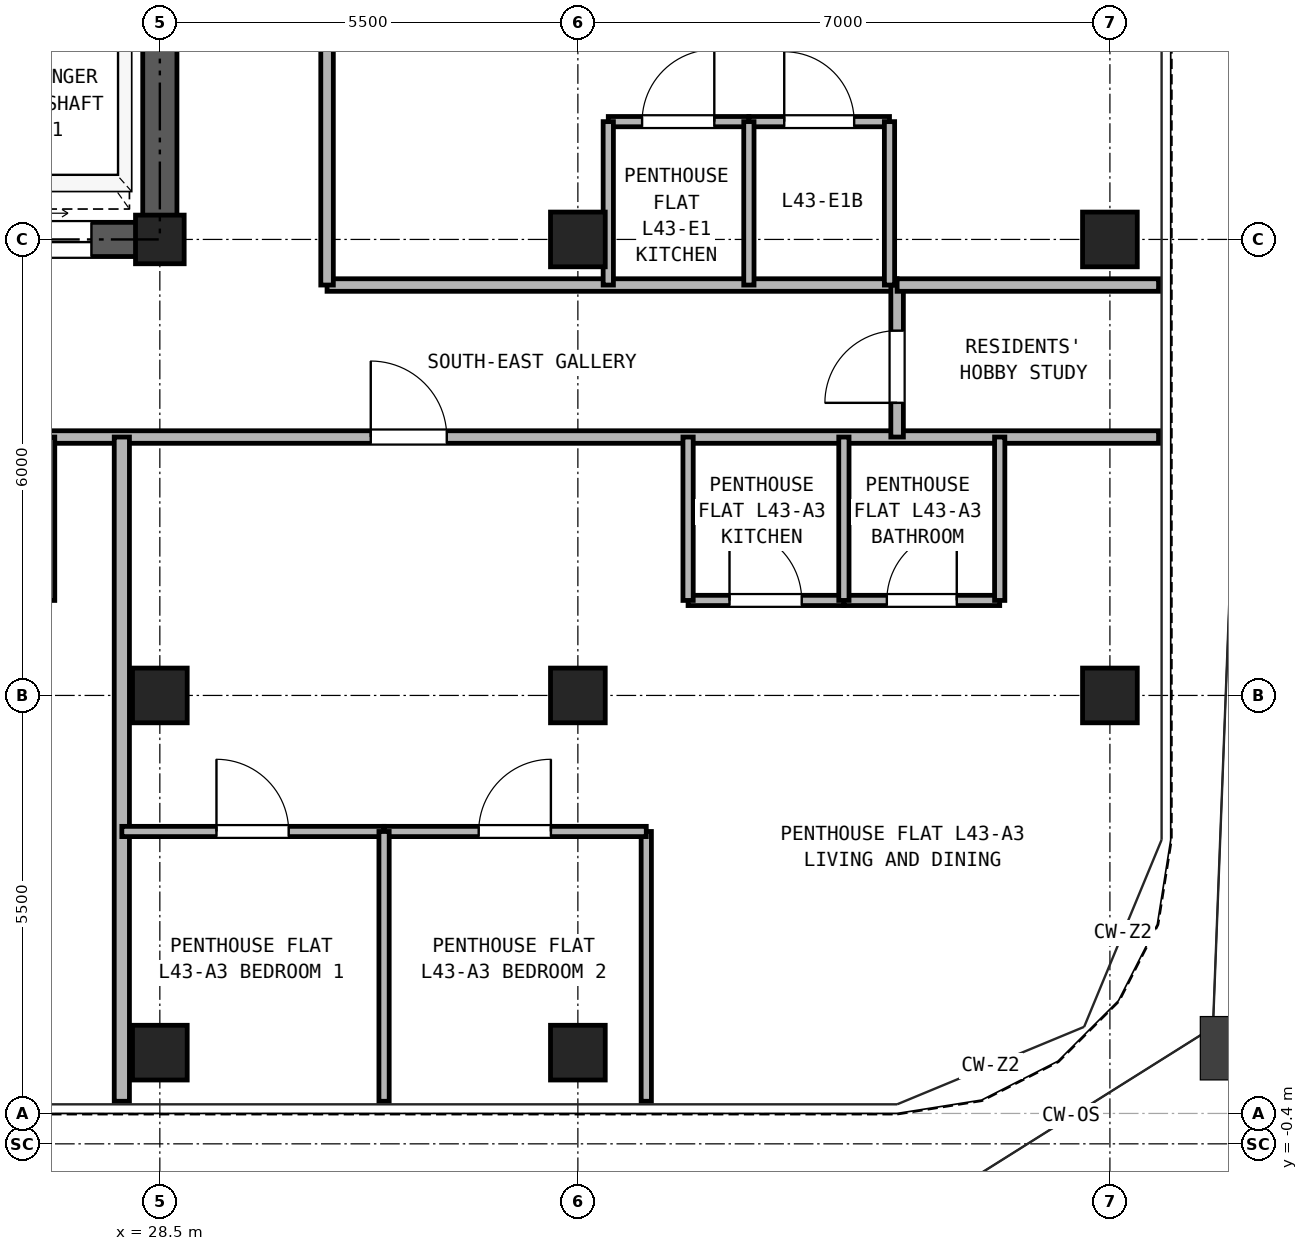
"""IFC4 building model, lengths in metres.
Left out: names, types, materials, properties, quantities, classifications, styles, units other than length and angle.
Written with IfcOpenShell. Run it as: python <this file> out.ifc"""

import sys

from ifc_helpers import new_model, si_unit, direction, frame, frame_2d, origin, origin_2d, place, context, subcontext, project, spatial, rectangle, hollow_rectangle, extrude, source, transform, mapped, element, fill, save


model = new_model("IFC4")
c1 = context("Model", 3, precision=1e-05, world=origin(), true_north=direction((0.0, 1.0)))
c2 = subcontext(c1, "Body", "Model", "MODEL_VIEW")
j1 = project(units=[si_unit("LENGTHUNIT", "METRE"), si_unit("PLANEANGLEUNIT", "RADIAN")], contexts=[c1])
p1 = place(None, origin())
s1 = spatial("IfcSite", under=j1, at=p1, CompositionType="ELEMENT")
p2 = place(p1, origin())
s2 = spatial("IfcBuilding", under=s1, at=p2, CompositionType="ELEMENT")
p3 = place(p2, frame((0.0, 0.0, 156.1)))
s3 = spatial("IfcBuildingStorey", under=s2, at=p3, CompositionType="ELEMENT", Elevation=156.1)
m1 = source(origin(), c2, "Body", "SweptSolid", [
    extrude(hollow_rectangle(XDim=0.72, YDim=0.72, WallThickness=0.04, at=origin_2d()), origin(), (0.0, 0.0, 1.0), 2.95),
])
for number, where, z_axis, x_axis in (
    (1, (28.5, 0.8, 0.0), (0.0, 0.0, 1.0), (1.0, 0.0, 0.0)),
    (2, (34.0, 0.8, 0.0), (0.0, 0.0, 1.0), (1.0, 0.0, 0.0)),
    (3, (41.0, 5.5, 0.0), (0.0, 0.0, 1.0), (1.0, 0.0, 0.0)),
    (4, (41.0, 11.5, 0.0), (0.0, 0.0, 1.0), (1.0, 0.0, 0.0)),
    (5, (28.5, 5.5, 0.0), (0.0, 0.0, 1.0), (1.0, 0.0, 0.0)),
):
    element("IfcColumn", number, at=place(p3, frame(where, z_axis=z_axis, x_axis=x_axis)), inside=s3, PredefinedType="COLUMN", context=c2, shape_type="MappedRepresentation", body=[
        mapped(m1, transform((0.0, 0.0, 0.0), x_axis=(1.0, 0.0, 0.0), y_axis=(0.0, 1.0, 0.0), z_axis=(0.0, 0.0, 1.0), scale=1.0)),
    ])
m2 = source(origin(), c2, "Body", "SweptSolid", [
    extrude(hollow_rectangle(XDim=0.64, YDim=0.64, WallThickness=0.035, at=origin_2d()), origin(), (0.0, 0.0, 1.0), 2.95),
])
p4 = place(p3, frame((28.5, 11.5, 0.0), z_axis=(0.0, 0.0, 1.0), x_axis=(1.0, 0.0, 0.0)))
e6 = element("IfcColumn", 6, at=p4, inside=s3, PredefinedType="COLUMN", context=c2, shape_type="MappedRepresentation", body=[
    mapped(m2, transform((0.0, 0.0, 0.0), x_axis=(1.0, 0.0, 0.0), y_axis=(0.0, 1.0, 0.0), z_axis=(0.0, 0.0, 1.0), scale=1.0)),
])
for number, where, z_axis, x_axis in (
    (7, (34.0, 5.5, 0.0), (0.0, 0.0, 1.0), (1.0, 0.0, 0.0)),
    (8, (34.0, 11.5, 0.0), (0.0, 0.0, 1.0), (1.0, 0.0, 0.0)),
):
    element("IfcColumn", number, at=place(p3, frame(where, z_axis=z_axis, x_axis=x_axis)), inside=s3, PredefinedType="COLUMN", context=c2, shape_type="MappedRepresentation", body=[
        mapped(m1, transform((0.0, 0.0, 0.0), x_axis=(1.0, 0.0, 0.0), y_axis=(0.0, 1.0, 0.0), z_axis=(0.0, 0.0, 1.0), scale=1.0)),
    ])
p5 = place(p3, frame((18.275, 11.5, 0.0), z_axis=(0.0, 0.0, 1.0), x_axis=(1.0, 0.0, 0.0)))
e9 = element("IfcWall", 9, at=p5, inside=s3, PredefinedType="SHEAR", context=c2, shape_type="SweptSolid", body=[
    extrude(rectangle(XDim=10.45, YDim=0.45, at=frame_2d((5.225, 0.0))), origin(), (0.0, 0.0, 1.0), 2.95),
])
p6 = place(p5, frame((2.325, 0.0, 0.0)))
e10 = element("IfcOpeningElement", 10, at=p6, cuts=e9, PredefinedType="OPENING", context=c2, shape_type="SweptSolid", body=[
    extrude(rectangle(XDim=0.95, YDim=2.15, at=frame_2d((0.475, 1.075))), frame((0.0, 0.235, 0.0), z_axis=(0.0, -1.0, 0.0), x_axis=(1.0, 0.0, 0.0)), (0.0, 0.0, 1.0), 0.47),
])
p7 = place(p5, frame((8.225, 0.0, 0.0)))
e11 = element("IfcOpeningElement", 11, at=p7, cuts=e9, PredefinedType="OPENING", context=c2, shape_type="SweptSolid", body=[
    extrude(rectangle(XDim=1.1, YDim=2.25, at=frame_2d((0.55, 1.125))), frame((0.0, 0.235, 0.0), z_axis=(0.0, -1.0, 0.0), x_axis=(1.0, 0.0, 0.0)), (0.0, 0.0, 1.0), 0.47),
])
p8 = place(p3, frame((28.5, 11.725, 0.0), z_axis=(0.0, 0.0, 1.0), x_axis=(0.0, 1.0, 0.0)))
e12 = element("IfcWall", 12, at=p8, inside=s3, PredefinedType="SHEAR", context=c2, shape_type="SweptSolid", body=[
    extrude(rectangle(XDim=16.8, YDim=0.45, at=frame_2d((8.4, 0.0))), origin(), (0.0, 0.0, 1.0), 2.95),
])
p9 = place(p8, frame((7.425, 0.0, 0.0)))
e13 = element("IfcOpeningElement", 13, at=p9, cuts=e12, PredefinedType="OPENING", context=c2, shape_type="SweptSolid", body=[
    extrude(rectangle(XDim=1.15, YDim=2.2, at=frame_2d((0.575, 1.1))), frame((0.0, 0.235, 0.0), z_axis=(0.0, -1.0, 0.0), x_axis=(1.0, 0.0, 0.0)), (0.0, 0.0, 1.0), 0.47),
])
p10 = place(p3, frame((0.16, 8.9, 0.0), z_axis=(0.0, 0.0, 1.0), x_axis=(1.0, 0.0, 0.0)))
e14 = element("IfcWall", 14, at=p10, inside=s3, PredefinedType="PARTITIONING", context=c2, shape_type="SweptSolid", body=[
    extrude(rectangle(XDim=41.48, YDim=0.165, at=frame_2d((20.74, 0.0))), origin(), (0.0, 0.0, 1.0), 2.95),
])
p11 = place(p10, frame((12.165, 0.0, 0.0)))
e15 = element("IfcOpeningElement", 15, at=p11, cuts=e14, PredefinedType="OPENING", context=c2, shape_type="SweptSolid", body=[
    extrude(rectangle(XDim=1.0, YDim=2.15, at=frame_2d((0.5, 1.075))), frame((0.0, 0.093, 0.0), z_axis=(0.0, -1.0, 0.0), x_axis=(1.0, 0.0, 0.0)), (0.0, 0.0, 1.0), 0.185),
])
p12 = place(p10, frame((17.965, 0.0, 0.0)))
e16 = element("IfcOpeningElement", 16, at=p12, cuts=e14, PredefinedType="OPENING", context=c2, shape_type="SweptSolid", body=[
    extrude(rectangle(XDim=1.0, YDim=2.15, at=frame_2d((0.5, 1.075))), frame((0.0, 0.093, 0.0), z_axis=(0.0, -1.0, 0.0), x_axis=(1.0, 0.0, 0.0)), (0.0, 0.0, 1.0), 0.185),
])
p13 = place(p10, frame((31.115, 0.0, 0.0)))
e17 = element("IfcOpeningElement", 17, at=p13, cuts=e14, PredefinedType="OPENING", context=c2, shape_type="SweptSolid", body=[
    extrude(rectangle(XDim=1.0, YDim=2.15, at=frame_2d((0.5, 1.075))), frame((0.0, 0.093, 0.0), z_axis=(0.0, -1.0, 0.0), x_axis=(1.0, 0.0, 0.0)), (0.0, 0.0, 1.0), 0.185),
])
p14 = place(p3, frame((30.7, 10.9, 0.0), z_axis=(0.0, 0.0, 1.0), x_axis=(1.0, 0.0, 0.0)))
e18 = element("IfcWall", 18, at=p14, inside=s3, PredefinedType="PARTITIONING", context=c2, shape_type="SweptSolid", body=[
    extrude(rectangle(XDim=7.5, YDim=0.165, at=frame_2d((3.75, 0.0))), origin(), (0.0, 0.0, 1.0), 2.95),
])
p15 = place(p3, frame((38.2, 8.9, 0.0), z_axis=(0.0, 0.0, 1.0), x_axis=(0.0, 1.0, 0.0)))
e19 = element("IfcWall", 19, at=p15, inside=s3, PredefinedType="PARTITIONING", context=c2, shape_type="SweptSolid", body=[
    extrude(rectangle(XDim=2.0, YDim=0.165, at=frame_2d((1.0, 0.0))), origin(), (0.0, 0.0, 1.0), 2.95),
])
p16 = place(p15, frame((0.45, 0.0, 0.0)))
e20 = element("IfcOpeningElement", 20, at=p16, cuts=e19, PredefinedType="OPENING", context=c2, shape_type="SweptSolid", body=[
    extrude(rectangle(XDim=0.95, YDim=2.15, at=frame_2d((0.475, 1.075))), frame((0.0, 0.093, 0.0), z_axis=(0.0, -1.0, 0.0), x_axis=(1.0, 0.0, 0.0)), (0.0, 0.0, 1.0), 0.185),
])
p17 = place(p3, frame((30.7, 10.9, 0.0), z_axis=(0.0, 0.0, 1.0), x_axis=(0.0, 1.0, 0.0)))
e21 = element("IfcWall", 21, at=p17, inside=s3, PredefinedType="PARTITIONING", context=c2, shape_type="SweptSolid", body=[
    extrude(rectangle(XDim=24.24, YDim=0.165, at=frame_2d((12.12, 0.0))), origin(), (0.0, 0.0, 1.0), 2.95),
])
p18 = place(p17, frame((5.3, 0.0, 0.0)))
e22 = element("IfcOpeningElement", 22, at=p18, cuts=e21, PredefinedType="OPENING", context=c2, shape_type="SweptSolid", body=[
    extrude(rectangle(XDim=1.0, YDim=2.15, at=frame_2d((0.5, 1.075))), frame((0.0, 0.093, 0.0), z_axis=(0.0, -1.0, 0.0), x_axis=(1.0, 0.0, 0.0)), (0.0, 0.0, 1.0), 0.185),
])
p19 = place(p17, frame((15.05, 0.0, 0.0)))
e23 = element("IfcOpeningElement", 23, at=p19, cuts=e21, PredefinedType="OPENING", context=c2, shape_type="SweptSolid", body=[
    extrude(rectangle(XDim=1.0, YDim=2.15, at=frame_2d((0.5, 1.075))), frame((0.0, 0.093, 0.0), z_axis=(0.0, -1.0, 0.0), x_axis=(1.0, 0.0, 0.0)), (0.0, 0.0, 1.0), 0.185),
])
p20 = place(p3, frame((27.05, 6.75, 0.0), z_axis=(0.0, 0.0, 1.0), x_axis=(0.0, 1.0, 0.0)))
e24 = element("IfcWall", 24, at=p20, inside=s3, PredefinedType="PARTITIONING", context=c2, shape_type="SweptSolid", body=[
    extrude(rectangle(XDim=2.15, YDim=0.135, at=frame_2d((1.075, 0.0))), origin(), (0.0, 0.0, 1.0), 2.95),
])
p21 = place(p3, frame((28.0, 0.16, 0.0), z_axis=(0.0, 0.0, 1.0), x_axis=(0.0, 1.0, 0.0)))
e25 = element("IfcWall", 25, at=p21, inside=s3, PredefinedType="PARTITIONING", context=c2, shape_type="SweptSolid", body=[
    extrude(rectangle(XDim=8.74, YDim=0.2, at=frame_2d((4.37, 0.0))), origin(), (0.0, 0.0, 1.0), 2.95),
])
p22 = place(p3, frame((35.45, 6.75, 0.0), z_axis=(0.0, 0.0, 1.0), x_axis=(1.0, 0.0, 0.0)))
e26 = element("IfcWall", 26, at=p22, inside=s3, PredefinedType="PARTITIONING", context=c2, shape_type="SweptSolid", body=[
    extrude(rectangle(XDim=2.05, YDim=0.135, at=frame_2d((1.025, 0.0))), origin(), (0.0, 0.0, 1.0), 2.95),
])
p23 = place(p22, frame((0.545, 0.0, 0.0)))
e27 = element("IfcOpeningElement", 27, at=p23, cuts=e26, PredefinedType="OPENING", context=c2, shape_type="SweptSolid", body=[
    extrude(rectangle(XDim=0.95, YDim=2.15, at=frame_2d((0.475, 1.075))), frame((0.0, 0.077, 0.0), z_axis=(0.0, -1.0, 0.0), x_axis=(1.0, 0.0, 0.0)), (0.0, 0.0, 1.0), 0.155),
])
p24 = place(p3, frame((37.5, 6.75, 0.0), z_axis=(0.0, 0.0, 1.0), x_axis=(1.0, 0.0, 0.0)))
e28 = element("IfcWall", 28, at=p24, inside=s3, PredefinedType="PARTITIONING", context=c2, shape_type="SweptSolid", body=[
    extrude(rectangle(XDim=2.05, YDim=0.135, at=frame_2d((1.025, 0.0))), origin(), (0.0, 0.0, 1.0), 2.95),
])
p25 = place(p24, frame((0.565, 0.0, 0.0)))
e29 = element("IfcOpeningElement", 29, at=p25, cuts=e28, PredefinedType="OPENING", context=c2, shape_type="SweptSolid", body=[
    extrude(rectangle(XDim=0.92, YDim=2.1, at=frame_2d((0.46, 1.05))), frame((0.0, 0.077, 0.0), z_axis=(0.0, -1.0, 0.0), x_axis=(1.0, 0.0, 0.0)), (0.0, 0.0, 1.0), 0.155),
])
for number, where, z_axis, x_axis in (
    (30, (35.45, 6.75, 0.0), (0.0, 0.0, 1.0), (0.0, 1.0, 0.0)),
    (31, (37.5, 6.75, 0.0), (0.0, 0.0, 1.0), (0.0, 1.0, 0.0)),
    (32, (39.55, 6.75, 0.0), (0.0, 0.0, 1.0), (0.0, 1.0, 0.0)),
):
    element("IfcWall", number, at=place(p3, frame(where, z_axis=z_axis, x_axis=x_axis)), inside=s3, PredefinedType="PARTITIONING", context=c2, shape_type="SweptSolid", body=[
        extrude(rectangle(XDim=2.15, YDim=0.135, at=frame_2d((1.075, 0.0))), origin(), (0.0, 0.0, 1.0), 2.95),
    ])
p26 = place(p3, frame((34.9, 0.16, 0.0), z_axis=(0.0, 0.0, 1.0), x_axis=(0.0, 1.0, 0.0)))
e33 = element("IfcWall", 33, at=p26, inside=s3, PredefinedType="PARTITIONING", context=c2, shape_type="SweptSolid", body=[
    extrude(rectangle(XDim=3.55, YDim=0.135, at=frame_2d((1.775, 0.0))), origin(), (0.0, 0.0, 1.0), 2.95),
])
p27 = place(p3, frame((28.0, 3.71, 0.0), z_axis=(0.0, 0.0, 1.0), x_axis=(1.0, 0.0, 0.0)))
e34 = element("IfcWall", 34, at=p27, inside=s3, PredefinedType="PARTITIONING", context=c2, shape_type="SweptSolid", body=[
    extrude(rectangle(XDim=3.45, YDim=0.135, at=frame_2d((1.725, 0.0))), origin(), (0.0, 0.0, 1.0), 2.95),
])
p28 = place(p27, frame((1.245, 0.0, 0.0)))
e35 = element("IfcOpeningElement", 35, at=p28, cuts=e34, PredefinedType="OPENING", context=c2, shape_type="SweptSolid", body=[
    extrude(rectangle(XDim=0.95, YDim=2.15, at=frame_2d((0.475, 1.075))), frame((0.0, 0.077, 0.0), z_axis=(0.0, -1.0, 0.0), x_axis=(1.0, 0.0, 0.0)), (0.0, 0.0, 1.0), 0.155),
])
p29 = place(p3, frame((31.45, 3.71, 0.0), z_axis=(0.0, 0.0, 1.0), x_axis=(1.0, 0.0, 0.0)))
e36 = element("IfcWall", 36, at=p29, inside=s3, PredefinedType="PARTITIONING", context=c2, shape_type="SweptSolid", body=[
    extrude(rectangle(XDim=3.45, YDim=0.135, at=frame_2d((1.725, 0.0))), origin(), (0.0, 0.0, 1.0), 2.95),
])
p30 = place(p29, frame((1.245, 0.0, 0.0)))
e37 = element("IfcOpeningElement", 37, at=p30, cuts=e36, PredefinedType="OPENING", context=c2, shape_type="SweptSolid", body=[
    extrude(rectangle(XDim=0.95, YDim=2.15, at=frame_2d((0.475, 1.075))), frame((0.0, 0.077, 0.0), z_axis=(0.0, -1.0, 0.0), x_axis=(1.0, 0.0, 0.0)), (0.0, 0.0, 1.0), 0.155),
])
p31 = place(p3, frame((31.45, 0.16, 0.0), z_axis=(0.0, 0.0, 1.0), x_axis=(0.0, 1.0, 0.0)))
e38 = element("IfcWall", 38, at=p31, inside=s3, PredefinedType="PARTITIONING", context=c2, shape_type="SweptSolid", body=[
    extrude(rectangle(XDim=3.55, YDim=0.135, at=frame_2d((1.775, 0.0))), origin(), (0.0, 0.0, 1.0), 2.95),
])
p32 = place(p3, frame((38.2, 10.9, 0.0), z_axis=(0.0, 0.0, 1.0), x_axis=(1.0, 0.0, 0.0)))
e39 = element("IfcWall", 39, at=p32, inside=s3, PredefinedType="PARTITIONING", context=c2, shape_type="SweptSolid", body=[
    extrude(rectangle(XDim=3.44, YDim=0.165, at=frame_2d((1.72, 0.0))), origin(), (0.0, 0.0, 1.0), 2.95),
])
p33 = place(p3, frame((34.4, 13.05, 0.0), z_axis=(0.0, 0.0, 1.0), x_axis=(1.0, 0.0, 0.0)))
e40 = element("IfcWall", 40, at=p33, inside=s3, PredefinedType="PARTITIONING", context=c2, shape_type="SweptSolid", body=[
    extrude(rectangle(XDim=1.85, YDim=0.135, at=frame_2d((0.925, 0.0))), origin(), (0.0, 0.0, 1.0), 2.95),
])
p34 = place(p33, frame((0.445, 0.0, 0.0)))
e41 = element("IfcOpeningElement", 41, at=p34, cuts=e40, PredefinedType="OPENING", context=c2, shape_type="SweptSolid", body=[
    extrude(rectangle(XDim=0.95, YDim=2.15, at=frame_2d((0.475, 1.075))), frame((0.0, 0.077, 0.0), z_axis=(0.0, -1.0, 0.0), x_axis=(1.0, 0.0, 0.0)), (0.0, 0.0, 1.0), 0.155),
])
p35 = place(p3, frame((36.25, 13.05, 0.0), z_axis=(0.0, 0.0, 1.0), x_axis=(1.0, 0.0, 0.0)))
e42 = element("IfcWall", 42, at=p35, inside=s3, PredefinedType="PARTITIONING", context=c2, shape_type="SweptSolid", body=[
    extrude(rectangle(XDim=1.85, YDim=0.135, at=frame_2d((0.925, 0.0))), origin(), (0.0, 0.0, 1.0), 2.95),
])
p36 = place(p35, frame((0.465, 0.0, 0.0)))
e43 = element("IfcOpeningElement", 43, at=p36, cuts=e42, PredefinedType="OPENING", context=c2, shape_type="SweptSolid", body=[
    extrude(rectangle(XDim=0.92, YDim=2.1, at=frame_2d((0.46, 1.05))), frame((0.0, 0.077, 0.0), z_axis=(0.0, -1.0, 0.0), x_axis=(1.0, 0.0, 0.0)), (0.0, 0.0, 1.0), 0.155),
])
for number, where, z_axis, x_axis in (
    (44, (34.4, 10.9, 0.0), (0.0, 0.0, 1.0), (0.0, 1.0, 0.0)),
    (45, (36.25, 10.9, 0.0), (0.0, 0.0, 1.0), (0.0, 1.0, 0.0)),
    (46, (38.1, 10.9, 0.0), (0.0, 0.0, 1.0), (0.0, 1.0, 0.0)),
):
    element("IfcWall", number, at=place(p3, frame(where, z_axis=z_axis, x_axis=x_axis)), inside=s3, PredefinedType="PARTITIONING", context=c2, shape_type="SweptSolid", body=[
        extrude(rectangle(XDim=2.15, YDim=0.135, at=frame_2d((1.075, 0.0))), origin(), (0.0, 0.0, 1.0), 2.95),
    ])
p37 = place(p7, frame((1.1, 0.0, 0.0), z_axis=(0.0, 0.0, 1.0), x_axis=(-1.0, 0.0, 0.0)))
e47 = element("IfcDoor", 47, at=p37, inside=s3, OperationType="DOUBLE_DOOR_SLIDING", PredefinedType="DOOR", context=c2, shape_type="SweptSolid", body=[
    extrude(rectangle(XDim=1.1, YDim=2.25, at=frame_2d((0.55, 1.125))), frame((0.0, 0.025, 0.0), z_axis=(0.0, -1.0, 0.0), x_axis=(1.0, 0.0, 0.0)), (0.0, 0.0, 1.0), 0.05),
])
fill(e11, e47)
p38 = place(p23, origin())
e48 = element("IfcDoor", 48, at=p38, inside=s3, OperationType="SINGLE_SWING_LEFT", PredefinedType="DOOR", context=c2, shape_type="SweptSolid", body=[
    extrude(rectangle(XDim=0.95, YDim=2.15, at=frame_2d((0.475, 1.075))), frame((0.0, 0.025, 0.0), z_axis=(0.0, -1.0, 0.0), x_axis=(1.0, 0.0, 0.0)), (0.0, 0.0, 1.0), 0.05),
])
fill(e27, e48)
p39 = place(p25, origin())
e49 = element("IfcDoor", 49, at=p39, inside=s3, OperationType="SINGLE_SWING_RIGHT", PredefinedType="DOOR", context=c2, shape_type="SweptSolid", body=[
    extrude(rectangle(XDim=0.92, YDim=2.1, at=frame_2d((0.46, 1.05))), frame((0.0, 0.025, 0.0), z_axis=(0.0, -1.0, 0.0), x_axis=(1.0, 0.0, 0.0)), (0.0, 0.0, 1.0), 0.05),
])
fill(e29, e49)
p40 = place(p28, frame((0.95, 0.0, 0.0), z_axis=(0.0, 0.0, 1.0), x_axis=(-1.0, 0.0, 0.0)))
e50 = element("IfcDoor", 50, at=p40, inside=s3, OperationType="SINGLE_SWING_LEFT", PredefinedType="DOOR", context=c2, shape_type="SweptSolid", body=[
    extrude(rectangle(XDim=0.95, YDim=2.15, at=frame_2d((0.475, 1.075))), frame((0.0, 0.025, 0.0), z_axis=(0.0, -1.0, 0.0), x_axis=(1.0, 0.0, 0.0)), (0.0, 0.0, 1.0), 0.05),
])
fill(e35, e50)
p41 = place(p30, frame((0.95, 0.0, 0.0), z_axis=(0.0, 0.0, 1.0), x_axis=(-1.0, 0.0, 0.0)))
e51 = element("IfcDoor", 51, at=p41, inside=s3, OperationType="SINGLE_SWING_RIGHT", PredefinedType="DOOR", context=c2, shape_type="SweptSolid", body=[
    extrude(rectangle(XDim=0.95, YDim=2.15, at=frame_2d((0.475, 1.075))), frame((0.0, 0.025, 0.0), z_axis=(0.0, -1.0, 0.0), x_axis=(1.0, 0.0, 0.0)), (0.0, 0.0, 1.0), 0.05),
])
fill(e37, e51)
p42 = place(p13, frame((1.0, 0.0, 0.0), z_axis=(0.0, 0.0, 1.0), x_axis=(-1.0, 0.0, 0.0)))
e52 = element("IfcDoor", 52, at=p42, inside=s3, OperationType="SINGLE_SWING_LEFT", PredefinedType="DOOR", context=c2, shape_type="SweptSolid", body=[
    extrude(rectangle(XDim=1.0, YDim=2.15, at=frame_2d((0.5, 1.075))), frame((0.0, 0.025, 0.0), z_axis=(0.0, -1.0, 0.0), x_axis=(1.0, 0.0, 0.0)), (0.0, 0.0, 1.0), 0.05),
])
fill(e17, e52)
p43 = place(p16, origin())
e53 = element("IfcDoor", 53, at=p43, inside=s3, OperationType="SINGLE_SWING_LEFT", PredefinedType="DOOR", context=c2, shape_type="SweptSolid", body=[
    extrude(rectangle(XDim=0.95, YDim=2.15, at=frame_2d((0.475, 1.075))), frame((0.0, 0.025, 0.0), z_axis=(0.0, -1.0, 0.0), x_axis=(1.0, 0.0, 0.0)), (0.0, 0.0, 1.0), 0.05),
])
fill(e20, e53)
p44 = place(p34, origin())
e54 = element("IfcDoor", 54, at=p44, inside=s3, OperationType="SINGLE_SWING_RIGHT", PredefinedType="DOOR", context=c2, shape_type="SweptSolid", body=[
    extrude(rectangle(XDim=0.95, YDim=2.15, at=frame_2d((0.475, 1.075))), frame((0.0, 0.025, 0.0), z_axis=(0.0, -1.0, 0.0), x_axis=(1.0, 0.0, 0.0)), (0.0, 0.0, 1.0), 0.05),
])
fill(e41, e54)
p45 = place(p36, origin())
e55 = element("IfcDoor", 55, at=p45, inside=s3, OperationType="SINGLE_SWING_LEFT", PredefinedType="DOOR", context=c2, shape_type="SweptSolid", body=[
    extrude(rectangle(XDim=0.92, YDim=2.1, at=frame_2d((0.46, 1.05))), frame((0.0, 0.025, 0.0), z_axis=(0.0, -1.0, 0.0), x_axis=(1.0, 0.0, 0.0)), (0.0, 0.0, 1.0), 0.05),
])
fill(e43, e55)
save(model, sys.argv[1])
